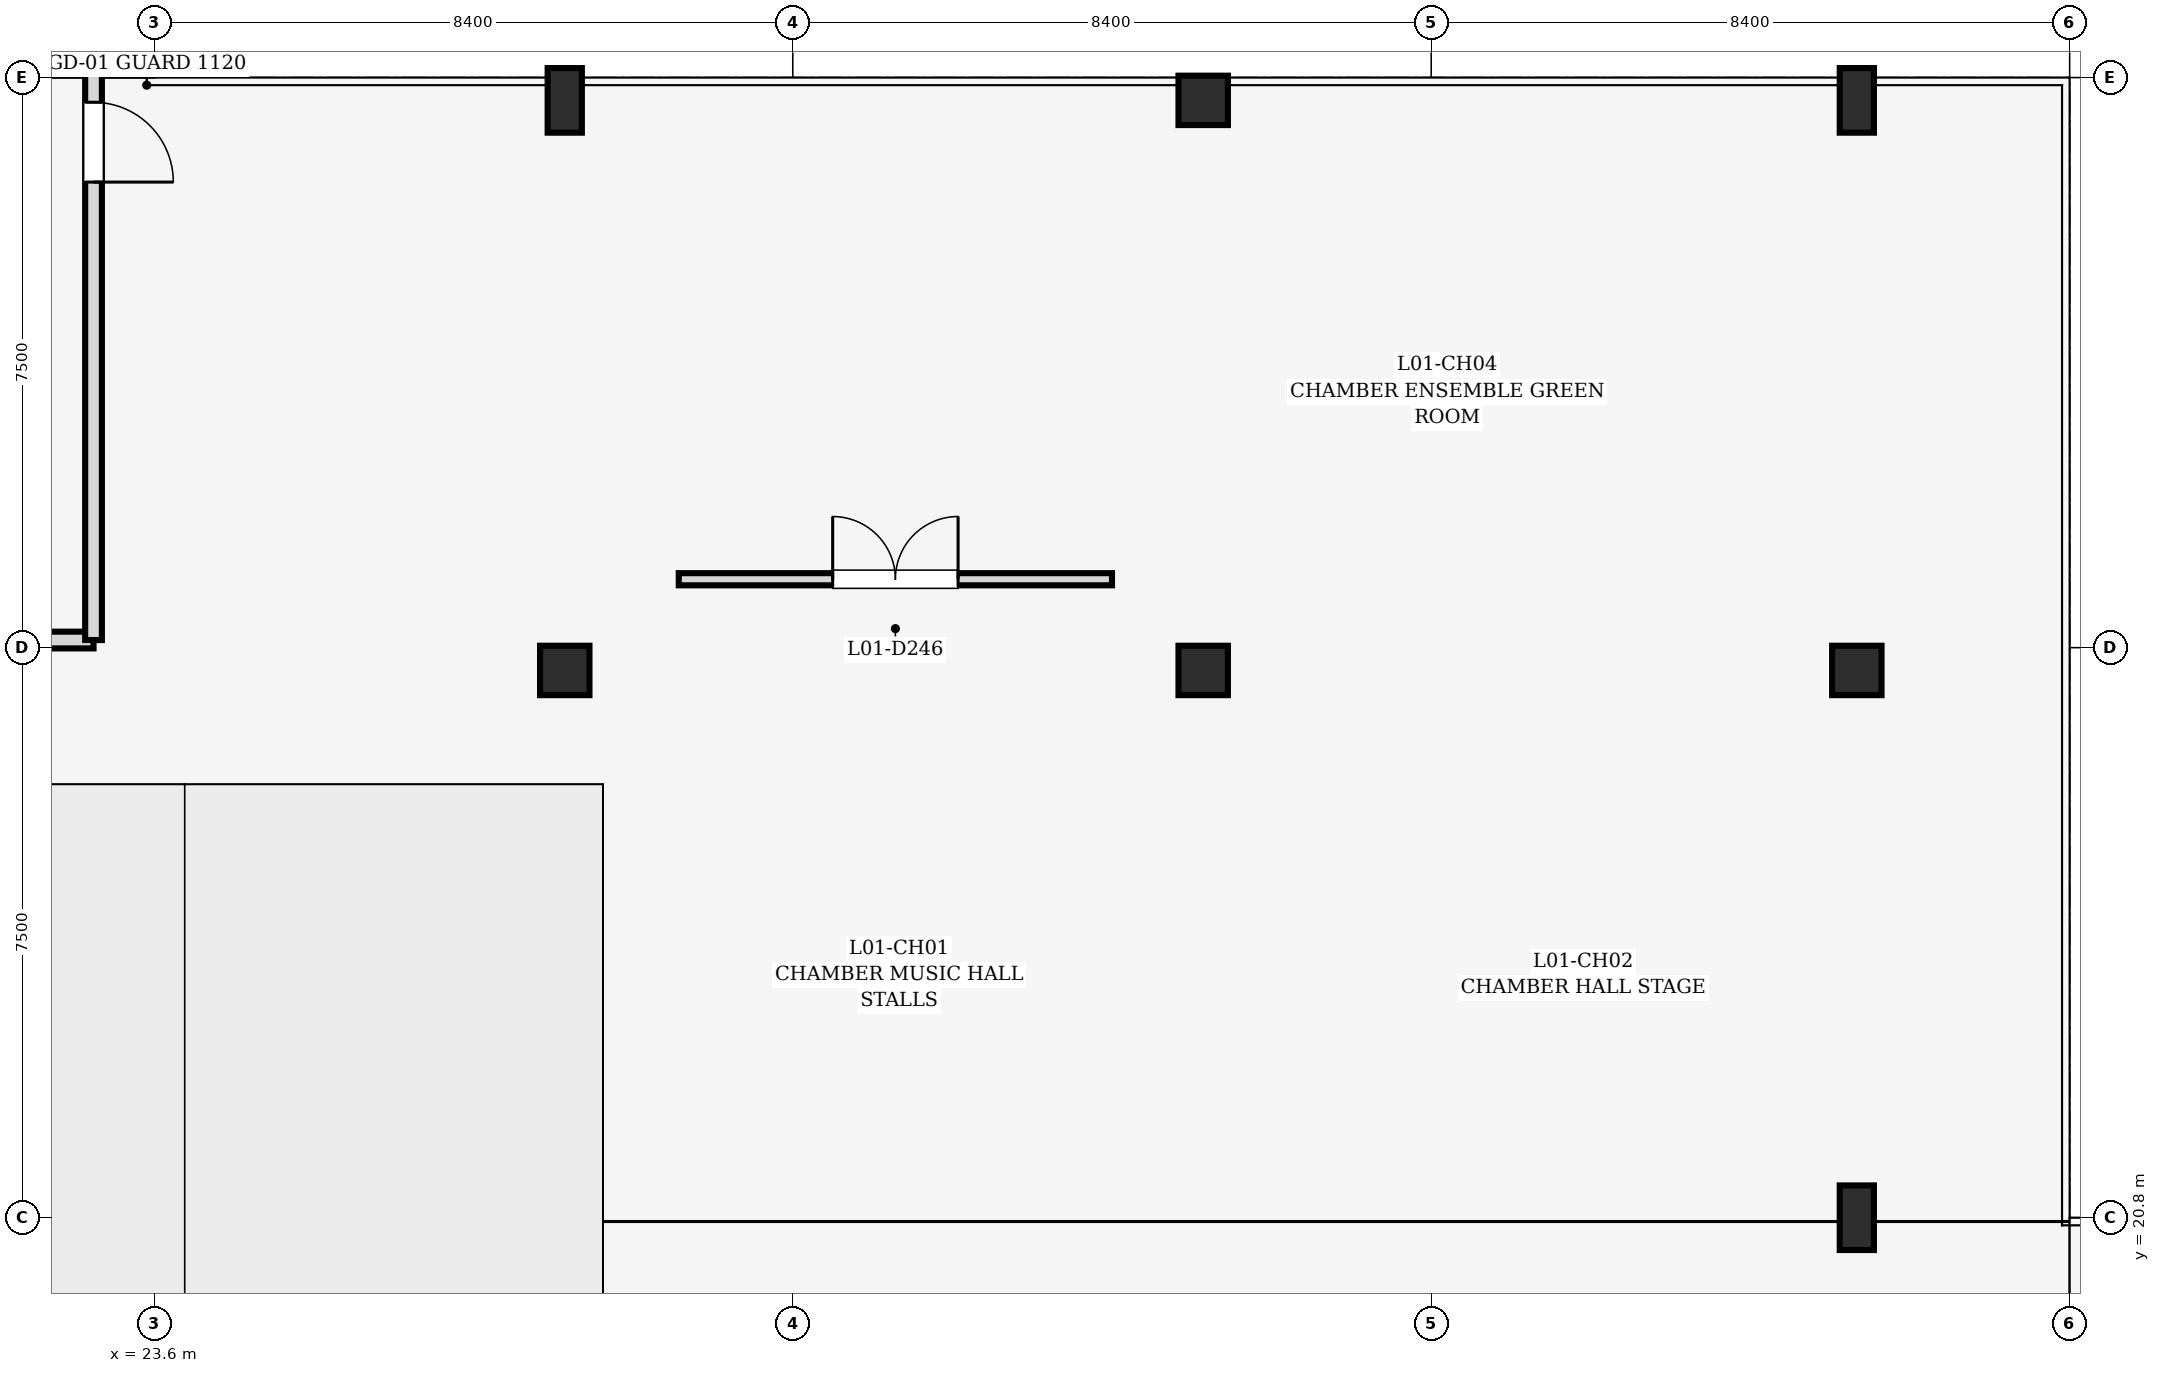
"""IFC4 building model, lengths in metres.
Left out: names, types, materials, properties, quantities, classifications, styles, units other than length and angle.
Written with IfcOpenShell. Run it as: python <this file> out.ifc"""

import sys

from ifc_helpers import new_model, si_unit, direction, frame, frame_2d, origin, origin_2d, place, context, subcontext, project, spatial, rectangle, extrude, element, fill, save


model = new_model("IFC4")
c1 = context("Model", 3, precision=1e-05, world=origin(), true_north=direction((0.0, 1.0)))
c2 = subcontext(c1, "Body", "Model", "MODEL_VIEW")
j1 = project(units=[si_unit("LENGTHUNIT", "METRE"), si_unit("PLANEANGLEUNIT", "RADIAN")], contexts=[c1])
p1 = place(None, origin())
s1 = spatial("IfcSite", under=j1, at=p1, CompositionType="ELEMENT")
p2 = place(p1, origin())
s2 = spatial("IfcBuilding", under=s1, at=p2, CompositionType="ELEMENT")
p3 = place(p2, origin())
s3 = spatial("IfcBuildingStorey", under=s2, at=p3, CompositionType="ELEMENT", Elevation=0.0)
p4 = place(p3, frame((29.0, 28.0, 0.0), z_axis=(0.0, 0.0, 1.0), x_axis=(1.0, 0.0, 0.0)))
e1 = element("IfcColumn", 1, at=p4, inside=s3, PredefinedType="COLUMN", context=c2, shape_type="SweptSolid", body=[
    extrude(rectangle(XDim=0.65, YDim=0.65, at=origin_2d()), origin(), (0.0, 0.0, 1.0), 5.4),
])
p5 = place(p3, frame((29.0, 35.5, 0.0), z_axis=(0.0, 0.0, 1.0), x_axis=(1.0, 0.0, 0.0)))
e2 = element("IfcColumn", 2, at=p5, inside=s3, PredefinedType="PILASTER", context=c2, shape_type="SweptSolid", body=[
    extrude(rectangle(XDim=0.45, YDim=0.85, at=origin_2d()), origin(), (0.0, 0.0, 1.0), 5.4),
])
for number, where, z_axis, x_axis in (
    (3, (37.4, 28.0, 0.0), (0.0, 0.0, 1.0), (1.0, 0.0, 0.0)),
    (4, (37.4, 35.5, 0.0), (0.0, 0.0, 1.0), (1.0, 0.0, 0.0)),
):
    element("IfcColumn", number, at=place(p3, frame(where, z_axis=z_axis, x_axis=x_axis)), inside=s3, PredefinedType="COLUMN", context=c2, shape_type="SweptSolid", body=[
        extrude(rectangle(XDim=0.65, YDim=0.65, at=origin_2d()), origin(), (0.0, 0.0, 1.0), 5.4),
    ])
p6 = place(p3, frame((46.0, 20.8, 0.0), z_axis=(0.0, 0.0, 1.0), x_axis=(1.0, 0.0, 0.0)))
e5 = element("IfcColumn", 5, at=p6, inside=s3, PredefinedType="PILASTER", context=c2, shape_type="SweptSolid", body=[
    extrude(rectangle(XDim=0.45, YDim=0.85, at=origin_2d()), origin(), (0.0, 0.0, 1.0), 5.4),
])
p7 = place(p3, frame((46.0, 28.0, 0.0), z_axis=(0.0, 0.0, 1.0), x_axis=(1.0, 0.0, 0.0)))
e6 = element("IfcColumn", 6, at=p7, inside=s3, PredefinedType="COLUMN", context=c2, shape_type="SweptSolid", body=[
    extrude(rectangle(XDim=0.65, YDim=0.65, at=origin_2d()), origin(), (0.0, 0.0, 1.0), 5.4),
])
p8 = place(p3, frame((46.0, 35.5, 0.0), z_axis=(0.0, 0.0, 1.0), x_axis=(1.0, 0.0, 0.0)))
e7 = element("IfcColumn", 7, at=p8, inside=s3, PredefinedType="PILASTER", context=c2, shape_type="SweptSolid", body=[
    extrude(rectangle(XDim=0.45, YDim=0.85, at=origin_2d()), origin(), (0.0, 0.0, 1.0), 5.4),
])
p9 = place(p3, frame((22.8, 28.4, 0.0), z_axis=(0.0, 0.0, 1.0), x_axis=(-1.0, 0.0, 0.0)))
e8 = element("IfcWall", 8, at=p9, inside=s3, PredefinedType="SOLIDWALL", context=c2, shape_type="SweptSolid", body=[
    extrude(rectangle(XDim=3.3, YDim=0.22, at=frame_2d((1.65, 0.0))), origin(), (0.0, 0.0, 1.0), 4.407),
])
p10 = place(p3, frame((22.8, 43.0, 0.0), z_axis=(0.0, 0.0, 1.0), x_axis=(0.0, -1.0, 0.0)))
e9 = element("IfcWall", 9, at=p10, inside=s3, PredefinedType="SOLIDWALL", context=c2, shape_type="SweptSolid", body=[
    extrude(rectangle(XDim=14.6, YDim=0.22, at=frame_2d((7.3, 0.0))), origin(), (0.0, 0.0, 1.0), 5.105),
])
p11 = place(p10, frame((7.525, 0.0, 0.0)))
e10 = element("IfcOpeningElement", 10, at=p11, cuts=e9, PredefinedType="OPENING", context=c2, shape_type="SweptSolid", body=[
    extrude(rectangle(XDim=1.05, YDim=2.15, at=frame_2d((0.525, 1.075))), frame((0.0, 0.122, 0.0), z_axis=(0.0, -1.0, 0.0), x_axis=(1.0, 0.0, 0.0)), (0.0, 0.0, 1.0), 0.244),
])
p12 = place(p3, frame((30.5, 29.2, 0.0), z_axis=(0.0, 0.0, 1.0), x_axis=(1.0, 0.0, 0.0)))
e11 = element("IfcWall", 11, at=p12, inside=s3, PredefinedType="PARTITIONING", context=c2, shape_type="SweptSolid", body=[
    extrude(rectangle(XDim=5.7, YDim=0.16, at=frame_2d((2.85, 0.0))), origin(), (0.0, 0.0, 1.0), 5.105),
])
p13 = place(p12, frame((2.025, 0.0, 0.0)))
e12 = element("IfcOpeningElement", 12, at=p13, cuts=e11, PredefinedType="OPENING", context=c2, shape_type="SweptSolid", body=[
    extrude(rectangle(XDim=1.65, YDim=2.22, at=frame_2d((0.825, 1.11))), frame((0.0, 0.092, 0.0), z_axis=(0.0, -1.0, 0.0), x_axis=(1.0, 0.0, 0.0)), (0.0, 0.0, 1.0), 0.184),
])
p14 = place(p11, origin())
e13 = element("IfcDoor", 13, at=p14, inside=s3, OperationType="SINGLE_SWING_RIGHT", PredefinedType="DOOR", context=c2, shape_type="SweptSolid", body=[
    extrude(rectangle(XDim=1.05, YDim=2.15, at=frame_2d((0.525, 1.075))), frame((0.0, 0.025, 0.0), z_axis=(0.0, -1.0, 0.0), x_axis=(1.0, 0.0, 0.0)), (0.0, 0.0, 1.0), 0.05),
])
fill(e10, e13)
p15 = place(p13, origin())
e14 = element("IfcDoor", 14, at=p15, inside=s3, OperationType="DOUBLE_DOOR_SINGLE_SWING", PredefinedType="DOOR", context=c2, shape_type="SweptSolid", body=[
    extrude(rectangle(XDim=1.65, YDim=2.22, at=frame_2d((0.825, 1.11))), frame((0.0, 0.025, 0.0), z_axis=(0.0, -1.0, 0.0), x_axis=(1.0, 0.0, 0.0)), (0.0, 0.0, 1.0), 0.05),
])
fill(e12, e14)
save(model, sys.argv[1])
